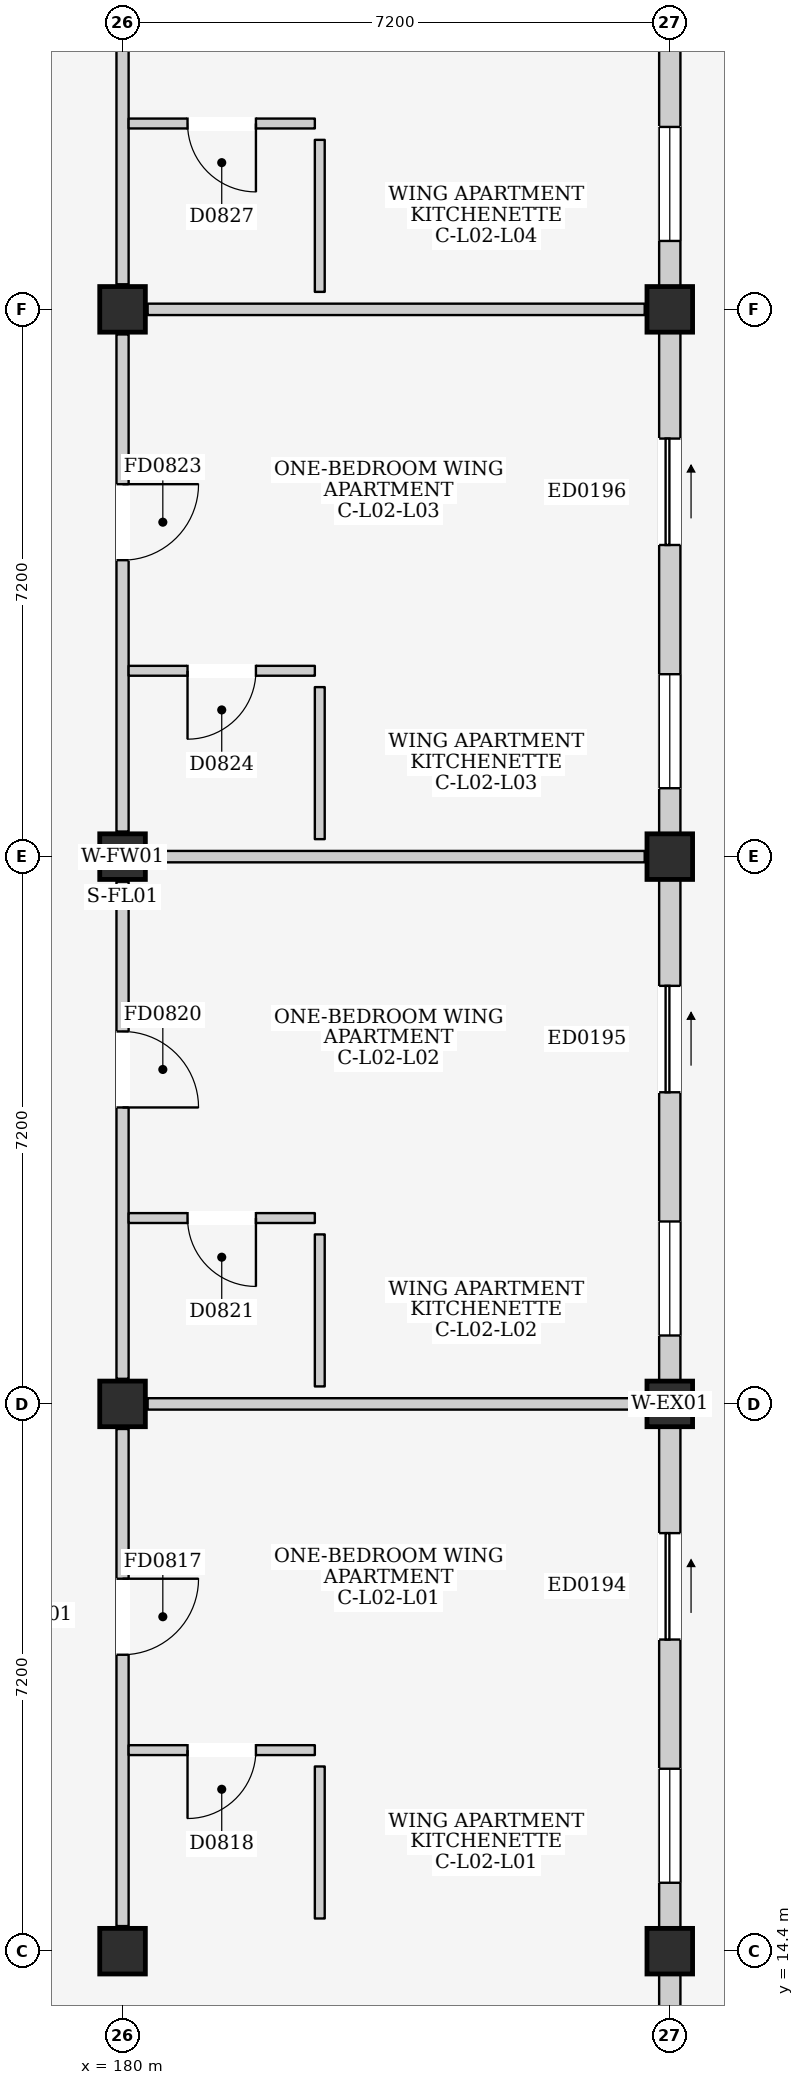
"""IFC4 building model, lengths in metres.
Left out: names, types, materials, properties, quantities, classifications, styles, units other than length and angle.
Written with IfcOpenShell. Run it as: python <this file> out.ifc"""

import sys

from ifc_helpers import new_model, si_unit, direction, frame, frame_2d, origin, origin_2d, place, context, subcontext, project, spatial, rectangle, extrude, element, fill, save


model = new_model("IFC4")
c1 = context("Model", 3, precision=1e-05, world=origin(), true_north=direction((0.0, 1.0)))
c2 = subcontext(c1, "Body", "Model", "MODEL_VIEW")
j1 = project(units=[si_unit("LENGTHUNIT", "METRE"), si_unit("PLANEANGLEUNIT", "RADIAN")], contexts=[c1])
p1 = place(None, origin())
s1 = spatial("IfcSite", under=j1, at=p1, CompositionType="ELEMENT")
p2 = place(p1, origin())
s2 = spatial("IfcBuilding", under=s1, at=p2, CompositionType="ELEMENT")
p3 = place(p2, frame((0.0, 0.0, 9.0)))
s3 = spatial("IfcBuildingStorey", under=s2, at=p3, CompositionType="ELEMENT", Elevation=9.0)
for number, where, z_axis, x_axis in (
    (1, (180.0, 14.4, 0.0), (0.0, 0.0, 1.0), (1.0, 0.0, 0.0)),
    (2, (180.0, 21.6, 0.0), (0.0, 0.0, 1.0), (1.0, 0.0, 0.0)),
    (3, (180.0, 28.8, 0.0), (0.0, 0.0, 1.0), (1.0, 0.0, 0.0)),
    (4, (180.0, 36.0, 0.0), (0.0, 0.0, 1.0), (1.0, 0.0, 0.0)),
    (5, (187.2, 14.4, 0.0), (0.0, 0.0, 1.0), (1.0, 0.0, 0.0)),
    (6, (187.2, 21.6, 0.0), (0.0, 0.0, 1.0), (1.0, 0.0, 0.0)),
    (7, (187.2, 28.8, 0.0), (0.0, 0.0, 1.0), (1.0, 0.0, 0.0)),
    (8, (187.2, 36.0, 0.0), (0.0, 0.0, 1.0), (1.0, 0.0, 0.0)),
):
    element("IfcColumn", number, at=place(p3, frame(where, z_axis=z_axis, x_axis=x_axis)), inside=s3, PredefinedType="COLUMN", context=c2, shape_type="SweptSolid", body=[
        extrude(rectangle(XDim=0.6, YDim=0.6, at=origin_2d()), origin(), (0.0, 0.0, 1.0), 3.2),
    ])
p4 = place(p3, frame((187.2, 7.5, 0.0), z_axis=(0.0, 0.0, 1.0), x_axis=(0.0, 1.0, 0.0)))
e9 = element("IfcWall", 9, at=p4, inside=s3, PredefinedType="ELEMENTEDWALL", context=c2, shape_type="SweptSolid", body=[
    extrude(rectangle(XDim=6.6, YDim=0.28, at=frame_2d((3.3, 0.0))), origin(), (0.0, 0.0, 1.0), 2.425),
])
p5 = place(p4, frame((3.65, 0.0, 0.0)))
e10 = element("IfcOpeningElement", 10, at=p5, cuts=e9, PredefinedType="OPENING", context=c2, shape_type="SweptSolid", body=[
    extrude(rectangle(XDim=1.4, YDim=2.1, at=frame_2d((0.7, 1.05))), frame((0.0, 0.155, 0.0), z_axis=(0.0, -1.0, 0.0), x_axis=(1.0, 0.0, 0.0)), (0.0, 0.0, 1.0), 0.31),
])
p6 = place(p3, frame((187.2, 14.7, 0.0), z_axis=(0.0, 0.0, 1.0), x_axis=(0.0, 1.0, 0.0)))
e11 = element("IfcWall", 11, at=p6, inside=s3, PredefinedType="ELEMENTEDWALL", context=c2, shape_type="SweptSolid", body=[
    extrude(rectangle(XDim=6.6, YDim=0.28, at=frame_2d((3.3, 0.0))), origin(), (0.0, 0.0, 1.0), 2.425),
])
p7 = place(p6, frame((3.8, 0.0, 0.0)))
e12 = element("IfcOpeningElement", 12, at=p7, cuts=e11, PredefinedType="OPENING", context=c2, shape_type="SweptSolid", body=[
    extrude(rectangle(XDim=1.4, YDim=2.1, at=frame_2d((0.7, 1.05))), frame((0.0, 0.155, 0.0), z_axis=(0.0, -1.0, 0.0), x_axis=(1.0, 0.0, 0.0)), (0.0, 0.0, 1.0), 0.31),
])
p8 = place(p6, frame((0.6, 0.0, 0.815)))
e13 = element("IfcOpeningElement", 13, at=p8, cuts=e11, PredefinedType="OPENING", context=c2, shape_type="SweptSolid", body=[
    extrude(rectangle(XDim=1.5, YDim=1.5, at=frame_2d((0.75, 0.75))), frame((0.0, 0.155, 0.0), z_axis=(0.0, -1.0, 0.0), x_axis=(1.0, 0.0, 0.0)), (0.0, 0.0, 1.0), 0.31),
])
p9 = place(p3, frame((187.2, 21.9, 0.0), z_axis=(0.0, 0.0, 1.0), x_axis=(0.0, 1.0, 0.0)))
e14 = element("IfcWall", 14, at=p9, inside=s3, PredefinedType="ELEMENTEDWALL", context=c2, shape_type="SweptSolid", body=[
    extrude(rectangle(XDim=6.6, YDim=0.28, at=frame_2d((3.3, 0.0))), origin(), (0.0, 0.0, 1.0), 2.425),
])
p10 = place(p9, frame((3.8, 0.0, 0.0)))
e15 = element("IfcOpeningElement", 15, at=p10, cuts=e14, PredefinedType="OPENING", context=c2, shape_type="SweptSolid", body=[
    extrude(rectangle(XDim=1.4, YDim=2.1, at=frame_2d((0.7, 1.05))), frame((0.0, 0.155, 0.0), z_axis=(0.0, -1.0, 0.0), x_axis=(1.0, 0.0, 0.0)), (0.0, 0.0, 1.0), 0.31),
])
p11 = place(p9, frame((0.6, 0.0, 0.815)))
e16 = element("IfcOpeningElement", 16, at=p11, cuts=e14, PredefinedType="OPENING", context=c2, shape_type="SweptSolid", body=[
    extrude(rectangle(XDim=1.5, YDim=1.5, at=frame_2d((0.75, 0.75))), frame((0.0, 0.155, 0.0), z_axis=(0.0, -1.0, 0.0), x_axis=(1.0, 0.0, 0.0)), (0.0, 0.0, 1.0), 0.31),
])
p12 = place(p3, frame((187.2, 29.1, 0.0), z_axis=(0.0, 0.0, 1.0), x_axis=(0.0, 1.0, 0.0)))
e17 = element("IfcWall", 17, at=p12, inside=s3, PredefinedType="ELEMENTEDWALL", context=c2, shape_type="SweptSolid", body=[
    extrude(rectangle(XDim=6.6, YDim=0.28, at=frame_2d((3.3, 0.0))), origin(), (0.0, 0.0, 1.0), 2.425),
])
p13 = place(p12, frame((3.8, 0.0, 0.0)))
e18 = element("IfcOpeningElement", 18, at=p13, cuts=e17, PredefinedType="OPENING", context=c2, shape_type="SweptSolid", body=[
    extrude(rectangle(XDim=1.4, YDim=2.1, at=frame_2d((0.7, 1.05))), frame((0.0, 0.155, 0.0), z_axis=(0.0, -1.0, 0.0), x_axis=(1.0, 0.0, 0.0)), (0.0, 0.0, 1.0), 0.31),
])
p14 = place(p12, frame((0.6, 0.0, 0.815)))
e19 = element("IfcOpeningElement", 19, at=p14, cuts=e17, PredefinedType="OPENING", context=c2, shape_type="SweptSolid", body=[
    extrude(rectangle(XDim=1.5, YDim=1.5, at=frame_2d((0.75, 0.75))), frame((0.0, 0.155, 0.0), z_axis=(0.0, -1.0, 0.0), x_axis=(1.0, 0.0, 0.0)), (0.0, 0.0, 1.0), 0.31),
])
p15 = place(p3, frame((187.2, 36.3, 0.0), z_axis=(0.0, 0.0, 1.0), x_axis=(0.0, 1.0, 0.0)))
e20 = element("IfcWall", 20, at=p15, inside=s3, PredefinedType="ELEMENTEDWALL", context=c2, shape_type="SweptSolid", body=[
    extrude(rectangle(XDim=6.6, YDim=0.28, at=frame_2d((3.3, 0.0))), origin(), (0.0, 0.0, 1.0), 2.425),
])
p16 = place(p15, frame((3.8, 0.0, 0.0)))
e21 = element("IfcOpeningElement", 21, at=p16, cuts=e20, PredefinedType="OPENING", context=c2, shape_type="SweptSolid", body=[
    extrude(rectangle(XDim=1.4, YDim=2.1, at=frame_2d((0.7, 1.05))), frame((0.0, 0.155, 0.0), z_axis=(0.0, -1.0, 0.0), x_axis=(1.0, 0.0, 0.0)), (0.0, 0.0, 1.0), 0.31),
])
p17 = place(p15, frame((0.6, 0.0, 0.815)))
e22 = element("IfcOpeningElement", 22, at=p17, cuts=e20, PredefinedType="OPENING", context=c2, shape_type="SweptSolid", body=[
    extrude(rectangle(XDim=1.5, YDim=1.5, at=frame_2d((0.75, 0.75))), frame((0.0, 0.155, 0.0), z_axis=(0.0, -1.0, 0.0), x_axis=(1.0, 0.0, 0.0)), (0.0, 0.0, 1.0), 0.31),
])
p18 = place(p3, frame((180.0, 14.73, 0.0), z_axis=(0.0, 0.0, 1.0), x_axis=(0.0, 1.0, 0.0)))
e23 = element("IfcWall", 23, at=p18, inside=s3, PredefinedType="PARTITIONING", context=c2, shape_type="SweptSolid", body=[
    extrude(rectangle(XDim=6.54, YDim=0.16, at=frame_2d((3.27, 0.0))), origin(), (0.0, 0.0, 1.0), 2.395),
])
p19 = place(p18, frame((3.57, 0.0, 0.0)))
e24 = element("IfcOpeningElement", 24, at=p19, cuts=e23, PredefinedType="OPENING", context=c2, shape_type="SweptSolid", body=[
    extrude(rectangle(XDim=1.0, YDim=2.15, at=frame_2d((0.5, 1.075))), frame((0.0, 0.095, 0.0), z_axis=(0.0, -1.0, 0.0), x_axis=(1.0, 0.0, 0.0)), (0.0, 0.0, 1.0), 0.19),
])
p20 = place(p3, frame((180.33, 21.6, 0.0), z_axis=(0.0, 0.0, 1.0), x_axis=(1.0, 0.0, 0.0)))
e25 = element("IfcWall", 25, at=p20, inside=s3, PredefinedType="PARTITIONING", context=c2, shape_type="SweptSolid", body=[
    extrude(rectangle(XDim=6.54, YDim=0.15, at=frame_2d((3.27, 0.0))), origin(), (0.0, 0.0, 1.0), 2.345),
])
p21 = place(p3, frame((180.08, 17.045, 0.0), z_axis=(0.0, 0.0, 1.0), x_axis=(1.0, 0.0, 0.0)))
e26 = element("IfcWall", 26, at=p21, inside=s3, PredefinedType="PARTITIONING", context=c2, shape_type="SweptSolid", body=[
    extrude(rectangle(XDim=2.45, YDim=0.13, at=frame_2d((1.225, 0.0))), origin(), (0.0, 0.0, 1.0), 2.96),
])
p22 = place(p21, frame((0.775, 0.0, 0.0)))
e27 = element("IfcOpeningElement", 27, at=p22, cuts=e26, PredefinedType="OPENING", context=c2, shape_type="SweptSolid", body=[
    extrude(rectangle(XDim=0.9, YDim=2.1, at=frame_2d((0.45, 1.05))), frame((0.0, 0.08, 0.0), z_axis=(0.0, -1.0, 0.0), x_axis=(1.0, 0.0, 0.0)), (0.0, 0.0, 1.0), 0.16),
])
p23 = place(p3, frame((182.595, 14.83, 0.0), z_axis=(0.0, 0.0, 1.0), x_axis=(0.0, 1.0, 0.0)))
e28 = element("IfcWall", 28, at=p23, inside=s3, PredefinedType="PARTITIONING", context=c2, shape_type="SweptSolid", body=[
    extrude(rectangle(XDim=2.0, YDim=0.13, at=frame_2d((1.0, 0.0))), origin(), (0.0, 0.0, 1.0), 2.96),
])
p24 = place(p3, frame((180.0, 21.93, 0.0), z_axis=(0.0, 0.0, 1.0), x_axis=(0.0, 1.0, 0.0)))
e29 = element("IfcWall", 29, at=p24, inside=s3, PredefinedType="PARTITIONING", context=c2, shape_type="SweptSolid", body=[
    extrude(rectangle(XDim=6.54, YDim=0.16, at=frame_2d((3.27, 0.0))), origin(), (0.0, 0.0, 1.0), 2.395),
])
p25 = place(p24, frame((3.57, 0.0, 0.0)))
e30 = element("IfcOpeningElement", 30, at=p25, cuts=e29, PredefinedType="OPENING", context=c2, shape_type="SweptSolid", body=[
    extrude(rectangle(XDim=1.0, YDim=2.15, at=frame_2d((0.5, 1.075))), frame((0.0, 0.095, 0.0), z_axis=(0.0, -1.0, 0.0), x_axis=(1.0, 0.0, 0.0)), (0.0, 0.0, 1.0), 0.19),
])
p26 = place(p3, frame((180.33, 28.8, 0.0), z_axis=(0.0, 0.0, 1.0), x_axis=(1.0, 0.0, 0.0)))
e31 = element("IfcWall", 31, at=p26, inside=s3, PredefinedType="PARTITIONING", context=c2, shape_type="SweptSolid", body=[
    extrude(rectangle(XDim=6.54, YDim=0.15, at=frame_2d((3.27, 0.0))), origin(), (0.0, 0.0, 1.0), 2.345),
])
p27 = place(p3, frame((180.08, 24.045, 0.0), z_axis=(0.0, 0.0, 1.0), x_axis=(1.0, 0.0, 0.0)))
e32 = element("IfcWall", 32, at=p27, inside=s3, PredefinedType="PARTITIONING", context=c2, shape_type="SweptSolid", body=[
    extrude(rectangle(XDim=2.45, YDim=0.13, at=frame_2d((1.225, 0.0))), origin(), (0.0, 0.0, 1.0), 2.96),
])
p28 = place(p27, frame((0.775, 0.0, 0.0)))
e33 = element("IfcOpeningElement", 33, at=p28, cuts=e32, PredefinedType="OPENING", context=c2, shape_type="SweptSolid", body=[
    extrude(rectangle(XDim=0.9, YDim=2.1, at=frame_2d((0.45, 1.05))), frame((0.0, 0.08, 0.0), z_axis=(0.0, -1.0, 0.0), x_axis=(1.0, 0.0, 0.0)), (0.0, 0.0, 1.0), 0.16),
])
p29 = place(p3, frame((182.595, 21.83, 0.0), z_axis=(0.0, 0.0, 1.0), x_axis=(0.0, 1.0, 0.0)))
e34 = element("IfcWall", 34, at=p29, inside=s3, PredefinedType="PARTITIONING", context=c2, shape_type="SweptSolid", body=[
    extrude(rectangle(XDim=2.0, YDim=0.13, at=frame_2d((1.0, 0.0))), origin(), (0.0, 0.0, 1.0), 2.96),
])
p30 = place(p3, frame((180.0, 29.13, 0.0), z_axis=(0.0, 0.0, 1.0), x_axis=(0.0, 1.0, 0.0)))
e35 = element("IfcWall", 35, at=p30, inside=s3, PredefinedType="PARTITIONING", context=c2, shape_type="SweptSolid", body=[
    extrude(rectangle(XDim=6.54, YDim=0.16, at=frame_2d((3.27, 0.0))), origin(), (0.0, 0.0, 1.0), 2.395),
])
p31 = place(p30, frame((3.57, 0.0, 0.0)))
e36 = element("IfcOpeningElement", 36, at=p31, cuts=e35, PredefinedType="OPENING", context=c2, shape_type="SweptSolid", body=[
    extrude(rectangle(XDim=1.0, YDim=2.15, at=frame_2d((0.5, 1.075))), frame((0.0, 0.095, 0.0), z_axis=(0.0, -1.0, 0.0), x_axis=(1.0, 0.0, 0.0)), (0.0, 0.0, 1.0), 0.19),
])
p32 = place(p3, frame((180.33, 36.0, 0.0), z_axis=(0.0, 0.0, 1.0), x_axis=(1.0, 0.0, 0.0)))
e37 = element("IfcWall", 37, at=p32, inside=s3, PredefinedType="PARTITIONING", context=c2, shape_type="SweptSolid", body=[
    extrude(rectangle(XDim=6.54, YDim=0.15, at=frame_2d((3.27, 0.0))), origin(), (0.0, 0.0, 1.0), 2.345),
])
p33 = place(p3, frame((180.08, 31.245, 0.0), z_axis=(0.0, 0.0, 1.0), x_axis=(1.0, 0.0, 0.0)))
e38 = element("IfcWall", 38, at=p33, inside=s3, PredefinedType="PARTITIONING", context=c2, shape_type="SweptSolid", body=[
    extrude(rectangle(XDim=2.45, YDim=0.13, at=frame_2d((1.225, 0.0))), origin(), (0.0, 0.0, 1.0), 2.96),
])
p34 = place(p33, frame((0.775, 0.0, 0.0)))
e39 = element("IfcOpeningElement", 39, at=p34, cuts=e38, PredefinedType="OPENING", context=c2, shape_type="SweptSolid", body=[
    extrude(rectangle(XDim=0.9, YDim=2.1, at=frame_2d((0.45, 1.05))), frame((0.0, 0.08, 0.0), z_axis=(0.0, -1.0, 0.0), x_axis=(1.0, 0.0, 0.0)), (0.0, 0.0, 1.0), 0.16),
])
p35 = place(p3, frame((182.595, 29.03, 0.0), z_axis=(0.0, 0.0, 1.0), x_axis=(0.0, 1.0, 0.0)))
e40 = element("IfcWall", 40, at=p35, inside=s3, PredefinedType="PARTITIONING", context=c2, shape_type="SweptSolid", body=[
    extrude(rectangle(XDim=2.0, YDim=0.13, at=frame_2d((1.0, 0.0))), origin(), (0.0, 0.0, 1.0), 2.96),
])
p36 = place(p3, frame((180.0, 36.33, 0.0), z_axis=(0.0, 0.0, 1.0), x_axis=(0.0, 1.0, 0.0)))
e41 = element("IfcWall", 41, at=p36, inside=s3, PredefinedType="PARTITIONING", context=c2, shape_type="SweptSolid", body=[
    extrude(rectangle(XDim=6.54, YDim=0.16, at=frame_2d((3.27, 0.0))), origin(), (0.0, 0.0, 1.0), 2.395),
])
p37 = place(p36, frame((3.57, 0.0, 0.0)))
e42 = element("IfcOpeningElement", 42, at=p37, cuts=e41, PredefinedType="OPENING", context=c2, shape_type="SweptSolid", body=[
    extrude(rectangle(XDim=1.0, YDim=2.15, at=frame_2d((0.5, 1.075))), frame((0.0, 0.095, 0.0), z_axis=(0.0, -1.0, 0.0), x_axis=(1.0, 0.0, 0.0)), (0.0, 0.0, 1.0), 0.19),
])
p38 = place(p3, frame((180.08, 38.445, 0.0), z_axis=(0.0, 0.0, 1.0), x_axis=(1.0, 0.0, 0.0)))
e43 = element("IfcWall", 43, at=p38, inside=s3, PredefinedType="PARTITIONING", context=c2, shape_type="SweptSolid", body=[
    extrude(rectangle(XDim=2.45, YDim=0.13, at=frame_2d((1.225, 0.0))), origin(), (0.0, 0.0, 1.0), 2.96),
])
p39 = place(p38, frame((0.775, 0.0, 0.0)))
e44 = element("IfcOpeningElement", 44, at=p39, cuts=e43, PredefinedType="OPENING", context=c2, shape_type="SweptSolid", body=[
    extrude(rectangle(XDim=0.9, YDim=2.1, at=frame_2d((0.45, 1.05))), frame((0.0, 0.08, 0.0), z_axis=(0.0, -1.0, 0.0), x_axis=(1.0, 0.0, 0.0)), (0.0, 0.0, 1.0), 0.16),
])
p40 = place(p3, frame((182.595, 36.23, 0.0), z_axis=(0.0, 0.0, 1.0), x_axis=(0.0, 1.0, 0.0)))
e45 = element("IfcWall", 45, at=p40, inside=s3, PredefinedType="PARTITIONING", context=c2, shape_type="SweptSolid", body=[
    extrude(rectangle(XDim=2.0, YDim=0.13, at=frame_2d((1.0, 0.0))), origin(), (0.0, 0.0, 1.0), 2.96),
])
p41 = place(p7, frame((1.4, 0.0, 0.0), z_axis=(0.0, 0.0, 1.0), x_axis=(-1.0, 0.0, 0.0)))
e46 = element("IfcDoor", 46, at=p41, inside=s3, OperationType="SLIDING_TO_RIGHT", PredefinedType="DOOR", context=c2, shape_type="SweptSolid", body=[
    extrude(rectangle(XDim=1.4, YDim=2.1, at=frame_2d((0.7, 1.05))), frame((0.0, 0.025, 0.0), z_axis=(0.0, -1.0, 0.0), x_axis=(1.0, 0.0, 0.0)), (0.0, 0.0, 1.0), 0.05),
])
fill(e12, e46)
p42 = place(p8, origin())
e47 = element("IfcWindow", 47, at=p42, inside=s3, PartitioningType="DOUBLE_PANEL_VERTICAL", PredefinedType="WINDOW", context=c2, shape_type="SweptSolid", body=[
    extrude(rectangle(XDim=1.5, YDim=1.5, at=frame_2d((0.75, 0.75))), frame((0.0, 0.03, 0.0), z_axis=(0.0, -1.0, 0.0), x_axis=(1.0, 0.0, 0.0)), (0.0, 0.0, 1.0), 0.06),
])
fill(e13, e47)
p43 = place(p10, frame((1.4, 0.0, 0.0), z_axis=(0.0, 0.0, 1.0), x_axis=(-1.0, 0.0, 0.0)))
e48 = element("IfcDoor", 48, at=p43, inside=s3, OperationType="SLIDING_TO_RIGHT", PredefinedType="DOOR", context=c2, shape_type="SweptSolid", body=[
    extrude(rectangle(XDim=1.4, YDim=2.1, at=frame_2d((0.7, 1.05))), frame((0.0, 0.025, 0.0), z_axis=(0.0, -1.0, 0.0), x_axis=(1.0, 0.0, 0.0)), (0.0, 0.0, 1.0), 0.05),
])
fill(e15, e48)
p44 = place(p11, origin())
e49 = element("IfcWindow", 49, at=p44, inside=s3, PartitioningType="DOUBLE_PANEL_VERTICAL", PredefinedType="WINDOW", context=c2, shape_type="SweptSolid", body=[
    extrude(rectangle(XDim=1.5, YDim=1.5, at=frame_2d((0.75, 0.75))), frame((0.0, 0.03, 0.0), z_axis=(0.0, -1.0, 0.0), x_axis=(1.0, 0.0, 0.0)), (0.0, 0.0, 1.0), 0.06),
])
fill(e16, e49)
p45 = place(p13, frame((1.4, 0.0, 0.0), z_axis=(0.0, 0.0, 1.0), x_axis=(-1.0, 0.0, 0.0)))
e50 = element("IfcDoor", 50, at=p45, inside=s3, OperationType="SLIDING_TO_RIGHT", PredefinedType="DOOR", context=c2, shape_type="SweptSolid", body=[
    extrude(rectangle(XDim=1.4, YDim=2.1, at=frame_2d((0.7, 1.05))), frame((0.0, 0.025, 0.0), z_axis=(0.0, -1.0, 0.0), x_axis=(1.0, 0.0, 0.0)), (0.0, 0.0, 1.0), 0.05),
])
fill(e18, e50)
p46 = place(p14, origin())
e51 = element("IfcWindow", 51, at=p46, inside=s3, PartitioningType="DOUBLE_PANEL_VERTICAL", PredefinedType="WINDOW", context=c2, shape_type="SweptSolid", body=[
    extrude(rectangle(XDim=1.5, YDim=1.5, at=frame_2d((0.75, 0.75))), frame((0.0, 0.03, 0.0), z_axis=(0.0, -1.0, 0.0), x_axis=(1.0, 0.0, 0.0)), (0.0, 0.0, 1.0), 0.06),
])
fill(e19, e51)
p47 = place(p17, origin())
e52 = element("IfcWindow", 52, at=p47, inside=s3, PartitioningType="DOUBLE_PANEL_VERTICAL", PredefinedType="WINDOW", context=c2, shape_type="SweptSolid", body=[
    extrude(rectangle(XDim=1.5, YDim=1.5, at=frame_2d((0.75, 0.75))), frame((0.0, 0.03, 0.0), z_axis=(0.0, -1.0, 0.0), x_axis=(1.0, 0.0, 0.0)), (0.0, 0.0, 1.0), 0.06),
])
fill(e22, e52)
p48 = place(p19, frame((1.0, 0.0, 0.0), z_axis=(0.0, 0.0, 1.0), x_axis=(-1.0, 0.0, 0.0)))
e53 = element("IfcDoor", 53, at=p48, inside=s3, OperationType="SINGLE_SWING_LEFT", PredefinedType="DOOR", context=c2, shape_type="SweptSolid", body=[
    extrude(rectangle(XDim=1.0, YDim=2.15, at=frame_2d((0.5, 1.075))), frame((0.0, 0.025, 0.0), z_axis=(0.0, -1.0, 0.0), x_axis=(1.0, 0.0, 0.0)), (0.0, 0.0, 1.0), 0.05),
])
fill(e24, e53)
p49 = place(p22, frame((0.9, 0.0, 0.0), z_axis=(0.0, 0.0, 1.0), x_axis=(-1.0, 0.0, 0.0)))
e54 = element("IfcDoor", 54, at=p49, inside=s3, OperationType="SINGLE_SWING_RIGHT", PredefinedType="DOOR", context=c2, shape_type="SweptSolid", body=[
    extrude(rectangle(XDim=0.9, YDim=2.1, at=frame_2d((0.45, 1.05))), frame((0.0, 0.025, 0.0), z_axis=(0.0, -1.0, 0.0), x_axis=(1.0, 0.0, 0.0)), (0.0, 0.0, 1.0), 0.05),
])
fill(e27, e54)
p50 = place(p25, frame((1.0, 0.0, 0.0), z_axis=(0.0, 0.0, 1.0), x_axis=(-1.0, 0.0, 0.0)))
e55 = element("IfcDoor", 55, at=p50, inside=s3, OperationType="SINGLE_SWING_RIGHT", PredefinedType="DOOR", context=c2, shape_type="SweptSolid", body=[
    extrude(rectangle(XDim=1.0, YDim=2.15, at=frame_2d((0.5, 1.075))), frame((0.0, 0.025, 0.0), z_axis=(0.0, -1.0, 0.0), x_axis=(1.0, 0.0, 0.0)), (0.0, 0.0, 1.0), 0.05),
])
fill(e30, e55)
p51 = place(p28, frame((0.9, 0.0, 0.0), z_axis=(0.0, 0.0, 1.0), x_axis=(-1.0, 0.0, 0.0)))
e56 = element("IfcDoor", 56, at=p51, inside=s3, OperationType="SINGLE_SWING_LEFT", PredefinedType="DOOR", context=c2, shape_type="SweptSolid", body=[
    extrude(rectangle(XDim=0.9, YDim=2.1, at=frame_2d((0.45, 1.05))), frame((0.0, 0.025, 0.0), z_axis=(0.0, -1.0, 0.0), x_axis=(1.0, 0.0, 0.0)), (0.0, 0.0, 1.0), 0.05),
])
fill(e33, e56)
p52 = place(p31, frame((1.0, 0.0, 0.0), z_axis=(0.0, 0.0, 1.0), x_axis=(-1.0, 0.0, 0.0)))
e57 = element("IfcDoor", 57, at=p52, inside=s3, OperationType="SINGLE_SWING_LEFT", PredefinedType="DOOR", context=c2, shape_type="SweptSolid", body=[
    extrude(rectangle(XDim=1.0, YDim=2.15, at=frame_2d((0.5, 1.075))), frame((0.0, 0.025, 0.0), z_axis=(0.0, -1.0, 0.0), x_axis=(1.0, 0.0, 0.0)), (0.0, 0.0, 1.0), 0.05),
])
fill(e36, e57)
p53 = place(p34, frame((0.9, 0.0, 0.0), z_axis=(0.0, 0.0, 1.0), x_axis=(-1.0, 0.0, 0.0)))
e58 = element("IfcDoor", 58, at=p53, inside=s3, OperationType="SINGLE_SWING_RIGHT", PredefinedType="DOOR", context=c2, shape_type="SweptSolid", body=[
    extrude(rectangle(XDim=0.9, YDim=2.1, at=frame_2d((0.45, 1.05))), frame((0.0, 0.025, 0.0), z_axis=(0.0, -1.0, 0.0), x_axis=(1.0, 0.0, 0.0)), (0.0, 0.0, 1.0), 0.05),
])
fill(e39, e58)
p54 = place(p39, frame((0.9, 0.0, 0.0), z_axis=(0.0, 0.0, 1.0), x_axis=(-1.0, 0.0, 0.0)))
e59 = element("IfcDoor", 59, at=p54, inside=s3, OperationType="SINGLE_SWING_LEFT", PredefinedType="DOOR", context=c2, shape_type="SweptSolid", body=[
    extrude(rectangle(XDim=0.9, YDim=2.1, at=frame_2d((0.45, 1.05))), frame((0.0, 0.025, 0.0), z_axis=(0.0, -1.0, 0.0), x_axis=(1.0, 0.0, 0.0)), (0.0, 0.0, 1.0), 0.05),
])
fill(e44, e59)
save(model, sys.argv[1])
